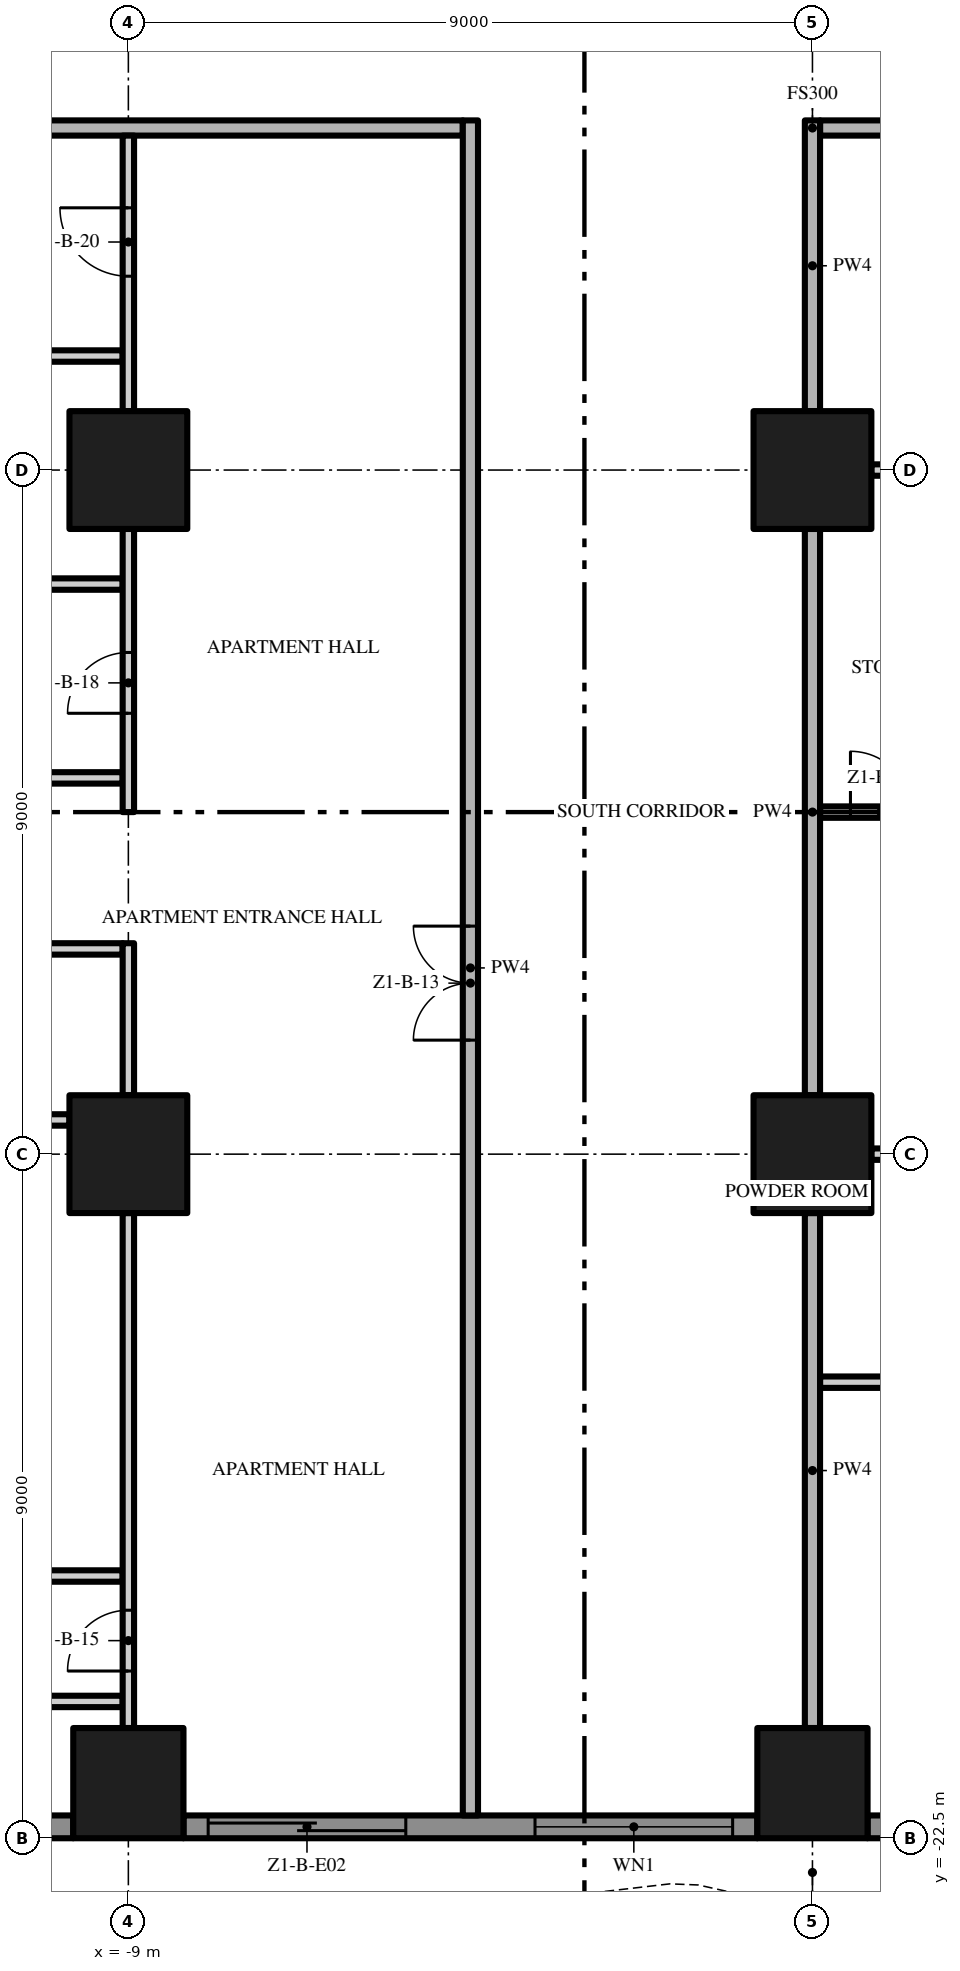
"""IFC4 building model, lengths in metres.
Left out: names, types, materials, properties, quantities, classifications, styles, units other than length and angle.
Written with IfcOpenShell. Run it as: python <this file> out.ifc"""

import sys

from ifc_helpers import new_model, si_unit, direction, frame, frame_2d, origin, origin_2d, place, context, subcontext, project, spatial, polyline, rectangle, outline, extrude, element, fill, save


model = new_model("IFC4")
c1 = context("Model", 3, precision=1e-05, world=origin(), true_north=direction((0.0, 1.0)))
c2 = subcontext(c1, "Body", "Model", "MODEL_VIEW")
j1 = project(units=[si_unit("LENGTHUNIT", "METRE"), si_unit("PLANEANGLEUNIT", "RADIAN")], contexts=[c1])
p1 = place(None, origin())
s1 = spatial("IfcSite", under=j1, at=p1, CompositionType="ELEMENT")
p2 = place(p1, origin())
s2 = spatial("IfcBuilding", under=s1, at=p2, CompositionType="ELEMENT")
p3 = place(p2, frame((0.0, 0.0, 26.4)))
s3 = spatial("IfcBuildingStorey", under=s2, at=p3, CompositionType="ELEMENT", Elevation=26.4)
p4 = place(p3, frame((-9.0, -13.5, 0.0), z_axis=(0.0, 0.0, 1.0), x_axis=(1.0, 0.0, 0.0)))
e1 = element("IfcColumn", 1, at=p4, inside=s3, PredefinedType="COLUMN", context=c2, shape_type="SweptSolid", body=[
    extrude(rectangle(XDim=1.55, YDim=1.55, at=origin_2d()), origin(), (0.0, 0.0, 1.0), 3.5),
])
p5 = place(p3, frame((-9.0, -21.775, 0.0), z_axis=(0.0, 0.0, 1.0), x_axis=(1.0, 0.0, 0.0)))
e2 = element("IfcColumn", 2, at=p5, inside=s3, PredefinedType="COLUMN", context=c2, shape_type="SweptSolid", body=[
    extrude(rectangle(XDim=1.45, YDim=1.45, at=origin_2d()), origin(), (0.0, 0.0, 1.0), 3.5),
])
for number, where, z_axis, x_axis in (
    (3, (-9.0, -4.5, 0.0), (0.0, 0.0, 1.0), (1.0, 0.0, 0.0)),
    (4, (0.0, -13.5, 0.0), (0.0, 0.0, 1.0), (1.0, 0.0, 0.0)),
):
    element("IfcColumn", number, at=place(p3, frame(where, z_axis=z_axis, x_axis=x_axis)), inside=s3, PredefinedType="COLUMN", context=c2, shape_type="SweptSolid", body=[
        extrude(rectangle(XDim=1.55, YDim=1.55, at=origin_2d()), origin(), (0.0, 0.0, 1.0), 3.5),
    ])
p6 = place(p3, frame((0.0, -21.775, 0.0), z_axis=(0.0, 0.0, 1.0), x_axis=(1.0, 0.0, 0.0)))
e5 = element("IfcColumn", 5, at=p6, inside=s3, PredefinedType="COLUMN", context=c2, shape_type="SweptSolid", body=[
    extrude(rectangle(XDim=1.45, YDim=1.45, at=origin_2d()), origin(), (0.0, 0.0, 1.0), 3.5),
])
p7 = place(p3, frame((0.0, -4.5, 0.0), z_axis=(0.0, 0.0, 1.0), x_axis=(1.0, 0.0, 0.0)))
e6 = element("IfcColumn", 6, at=p7, inside=s3, PredefinedType="COLUMN", context=c2, shape_type="SweptSolid", body=[
    extrude(rectangle(XDim=1.55, YDim=1.55, at=origin_2d()), origin(), (0.0, 0.0, 1.0), 3.5),
])
p8 = place(p3, frame((-9.725, -22.35, 0.0), z_axis=(0.0, 0.0, 1.0), x_axis=(-1.0, 0.0, 0.0)))
e7 = element("IfcWall", 7, at=p8, inside=s3, PredefinedType="SOLIDWALL", context=c2, shape_type="SweptSolid", body=[
    extrude(rectangle(XDim=7.55, YDim=0.3, at=frame_2d((3.775, 0.0))), origin(), (0.0, 0.0, 1.0), 3.5),
])
p9 = place(p8, frame((4.625, 0.0, 0.45)))
e8 = element("IfcOpeningElement", 8, at=p9, cuts=e7, PredefinedType="OPENING", context=c2, shape_type="SweptSolid", body=[
    extrude(rectangle(XDim=2.6, YDim=2.65, at=frame_2d((1.3, 1.325))), frame((0.0, 0.16, 0.0), z_axis=(0.0, -1.0, 0.0), x_axis=(1.0, 0.0, 0.0)), (0.0, 0.0, 1.0), 0.32),
])
p10 = place(p8, frame((0.325, 0.0, 0.0)))
e9 = element("IfcOpeningElement", 9, at=p10, cuts=e7, PredefinedType="OPENING", context=c2, shape_type="SweptSolid", body=[
    extrude(rectangle(XDim=2.6, YDim=2.4, at=frame_2d((1.3, 1.2))), frame((0.0, 0.16, 0.0), z_axis=(0.0, -1.0, 0.0), x_axis=(1.0, 0.0, 0.0)), (0.0, 0.0, 1.0), 0.32),
])
p11 = place(p3, frame((-0.725, -22.35, 0.0), z_axis=(0.0, 0.0, 1.0), x_axis=(-1.0, 0.0, 0.0)))
e10 = element("IfcWall", 10, at=p11, inside=s3, PredefinedType="SOLIDWALL", context=c2, shape_type="SweptSolid", body=[
    extrude(rectangle(XDim=7.55, YDim=0.3, at=frame_2d((3.775, 0.0))), origin(), (0.0, 0.0, 1.0), 3.5),
])
p12 = place(p11, frame((4.625, 0.0, 0.0)))
e11 = element("IfcOpeningElement", 11, at=p12, cuts=e10, PredefinedType="OPENING", context=c2, shape_type="SweptSolid", body=[
    extrude(rectangle(XDim=2.6, YDim=2.4, at=frame_2d((1.3, 1.2))), frame((0.0, 0.16, 0.0), z_axis=(0.0, -1.0, 0.0), x_axis=(1.0, 0.0, 0.0)), (0.0, 0.0, 1.0), 0.32),
])
p13 = place(p11, frame((0.325, 0.0, 0.45)))
e12 = element("IfcOpeningElement", 12, at=p13, cuts=e10, PredefinedType="OPENING", context=c2, shape_type="SweptSolid", body=[
    extrude(rectangle(XDim=2.6, YDim=2.65, at=frame_2d((1.3, 1.325))), frame((0.0, 0.16, 0.0), z_axis=(0.0, -1.0, 0.0), x_axis=(1.0, 0.0, 0.0)), (0.0, 0.0, 1.0), 0.32),
])
p14 = place(p3, frame((8.275, -22.35, 0.0), z_axis=(0.0, 0.0, 1.0), x_axis=(-1.0, 0.0, 0.0)))
e13 = element("IfcWall", 13, at=p14, inside=s3, PredefinedType="SOLIDWALL", context=c2, shape_type="SweptSolid", body=[
    extrude(rectangle(XDim=7.55, YDim=0.3, at=frame_2d((3.775, 0.0))), origin(), (0.0, 0.0, 1.0), 3.5),
])
p15 = place(p14, frame((4.625, 0.0, 0.45)))
e14 = element("IfcOpeningElement", 14, at=p15, cuts=e13, PredefinedType="OPENING", context=c2, shape_type="SweptSolid", body=[
    extrude(rectangle(XDim=2.6, YDim=2.65, at=frame_2d((1.3, 1.325))), frame((0.0, 0.16, 0.0), z_axis=(0.0, -1.0, 0.0), x_axis=(1.0, 0.0, 0.0)), (0.0, 0.0, 1.0), 0.32),
])
p16 = place(p14, frame((0.325, 0.0, 0.0)))
e15 = element("IfcOpeningElement", 15, at=p16, cuts=e13, PredefinedType="OPENING", context=c2, shape_type="SweptSolid", body=[
    extrude(rectangle(XDim=2.6, YDim=2.4, at=frame_2d((1.3, 1.2))), frame((0.0, 0.16, 0.0), z_axis=(0.0, -1.0, 0.0), x_axis=(1.0, 0.0, 0.0)), (0.0, 0.0, 1.0), 0.32),
])
p17 = place(p3, origin())
e16 = element("IfcWall", 16, at=p17, inside=s3, PredefinedType="USERDEFINED", context=c2, shape_type="SweptSolid", body=[
    extrude(outline(polyline([(-22.5, -25.149), (-21.0, -24.488), (-19.5, -23.755), (-18.0, -23.231), (-16.875, -23.1), (-16.5, -23.115), (-15.0, -23.451), (-13.5, -24.112), (-12.0, -24.845), (-10.5, -25.369), (-9.375, -25.5), (-9.0, -25.485), (-7.5, -25.149), (-6.0, -24.488), (-4.5, -23.755), (-3.0, -23.231), (-1.875, -23.1), (-1.5, -23.115), (0.0, -23.451), (1.5, -24.112), (3.0, -24.845), (4.5, -25.369), (5.625, -25.5), (6.0, -25.485), (7.5, -25.149), (9.0, -24.488), (10.5, -23.755), (12.0, -23.231), (13.125, -23.1), (13.5, -23.115), (15.0, -23.451), (16.5, -24.112), (18.0, -24.845), (19.5, -25.369), (20.625, -25.5), (21.0, -25.485), (22.5, -25.149), (22.445, -24.905), (20.967, -25.236), (20.635, -25.249), (19.556, -25.124), (18.096, -24.614), (16.605, -23.885), (15.079, -23.213), (13.533, -22.866), (13.115, -22.849), (11.944, -22.986), (10.404, -23.524), (8.895, -24.261), (7.421, -24.91), (5.967, -25.236), (5.635, -25.249), (4.556, -25.124), (3.096, -24.614), (1.605, -23.885), (0.079, -23.213), (-1.467, -22.866), (-1.885, -22.849), (-3.056, -22.986), (-4.596, -23.524), (-6.105, -24.261), (-7.579, -24.91), (-9.033, -25.236), (-9.365, -25.249), (-10.444, -25.124), (-11.904, -24.614), (-13.395, -23.885), (-14.921, -23.213), (-16.467, -22.866), (-16.885, -22.849), (-18.056, -22.986), (-19.596, -23.524), (-21.105, -24.261), (-22.601, -24.92), (-22.5, -25.149)])), origin(), (0.0, 0.0, 1.0), 0.9),
])
for number, where, z_axis, x_axis in (
    (17, (-13.425, -20.7, 0.0), (0.0, 0.0, 1.0), (1.0, 0.0, 0.0)),
    (18, (-13.425, -19.05, 0.0), (0.0, 0.0, 1.0), (1.0, 0.0, 0.0)),
):
    element("IfcWall", number, at=place(p3, frame(where, z_axis=z_axis, x_axis=x_axis)), inside=s3, PredefinedType="PARTITIONING", context=c2, shape_type="SweptSolid", body=[
        extrude(rectangle(XDim=4.35, YDim=0.15, at=frame_2d((2.175, 0.0))), origin(), (0.0, 0.0, 1.0), 3.5),
    ])
p18 = place(p3, frame((0.1, -16.5, 0.0), z_axis=(0.0, 0.0, 1.0), x_axis=(1.0, 0.0, 0.0)))
e19 = element("IfcWall", 19, at=p18, inside=s3, PredefinedType="PARTITIONING", context=c2, shape_type="SweptSolid", body=[
    extrude(rectangle(XDim=2.075, YDim=0.15, at=frame_2d((1.038, 0.0))), origin(), (0.0, 0.0, 1.0), 3.5),
])
p19 = place(p3, frame((8.225, -13.5, 0.0), z_axis=(0.0, 0.0, 1.0), x_axis=(-1.0, 0.0, 0.0)))
e20 = element("IfcWall", 20, at=p19, inside=s3, PredefinedType="PARTITIONING", context=c2, shape_type="SweptSolid", body=[
    extrude(rectangle(XDim=7.45, YDim=0.15, at=frame_2d((3.725, 0.0))), origin(), (0.0, 0.0, 1.0), 3.5),
])
p20 = place(p19, frame((1.725, 0.0, 0.0)))
e21 = element("IfcOpeningElement", 21, at=p20, cuts=e20, PredefinedType="OPENING", context=c2, shape_type="SweptSolid", body=[
    extrude(rectangle(XDim=1.8, YDim=2.4, at=frame_2d((0.9, 1.2))), frame((0.0, 0.085, 0.0), z_axis=(0.0, -1.0, 0.0), x_axis=(1.0, 0.0, 0.0)), (0.0, 0.0, 1.0), 0.17),
])
p21 = place(p3, frame((-13.425, -13.05, 0.0), z_axis=(0.0, 0.0, 1.0), x_axis=(1.0, 0.0, 0.0)))
e22 = element("IfcWall", 22, at=p21, inside=s3, PredefinedType="PARTITIONING", context=c2, shape_type="SweptSolid", body=[
    extrude(rectangle(XDim=3.65, YDim=0.15, at=frame_2d((1.825, 0.0))), origin(), (0.0, 0.0, 1.0), 3.5),
])
p22 = place(p3, frame((-9.075, -10.8, 0.0), z_axis=(0.0, 0.0, 1.0), x_axis=(-1.0, 0.0, 0.0)))
e23 = element("IfcWall", 23, at=p22, inside=s3, PredefinedType="PARTITIONING", context=c2, shape_type="SweptSolid", body=[
    extrude(rectangle(XDim=4.35, YDim=0.15, at=frame_2d((2.175, 0.0))), origin(), (0.0, 0.0, 1.0), 3.5),
])
p23 = place(p22, frame((1.7, 0.0, 0.0)))
e24 = element("IfcOpeningElement", 24, at=p23, cuts=e23, PredefinedType="OPENING", context=c2, shape_type="SweptSolid", body=[
    extrude(rectangle(XDim=0.9, YDim=2.1, at=frame_2d((0.45, 1.05))), frame((0.0, 0.085, 0.0), z_axis=(0.0, -1.0, 0.0), x_axis=(1.0, 0.0, 0.0)), (0.0, 0.0, 1.0), 0.17),
])
p24 = place(p3, frame((0.1, -9.0, 0.0), z_axis=(0.0, 0.0, 1.0), x_axis=(1.0, 0.0, 0.0)))
e25 = element("IfcWall", 25, at=p24, inside=s3, PredefinedType="PARTITIONING", context=c2, shape_type="SweptSolid", body=[
    extrude(rectangle(XDim=11.525, YDim=0.15, at=frame_2d((5.763, 0.0))), origin(), (0.0, 0.0, 1.0), 3.5),
])
p25 = place(p24, frame((0.4, 0.0, 0.0)))
e26 = element("IfcOpeningElement", 26, at=p25, cuts=e25, PredefinedType="OPENING", context=c2, shape_type="SweptSolid", body=[
    extrude(rectangle(XDim=0.8, YDim=2.0, at=frame_2d((0.4, 1.0))), frame((0.0, 0.085, 0.0), z_axis=(0.0, -1.0, 0.0), x_axis=(1.0, 0.0, 0.0)), (0.0, 0.0, 1.0), 0.17),
])
p26 = place(p24, frame((5.85, 0.0, 0.0)))
e27 = element("IfcOpeningElement", 27, at=p26, cuts=e25, PredefinedType="OPENING", context=c2, shape_type="SweptSolid", body=[
    extrude(rectangle(XDim=1.0, YDim=2.4, at=frame_2d((0.5, 1.2))), frame((0.0, 0.085, 0.0), z_axis=(0.0, -1.0, 0.0), x_axis=(1.0, 0.0, 0.0)), (0.0, 0.0, 1.0), 0.17),
])
for number, where, z_axis, x_axis in (
    (28, (-13.425, -8.55, 0.0), (0.0, 0.0, 1.0), (1.0, 0.0, 0.0)),
    (29, (-13.425, -6.0, 0.0), (0.0, 0.0, 1.0), (1.0, 0.0, 0.0)),
):
    element("IfcWall", number, at=place(p3, frame(where, z_axis=z_axis, x_axis=x_axis)), inside=s3, PredefinedType="PARTITIONING", context=c2, shape_type="SweptSolid", body=[
        extrude(rectangle(XDim=4.35, YDim=0.15, at=frame_2d((2.175, 0.0))), origin(), (0.0, 0.0, 1.0), 3.5),
    ])
p27 = place(p3, frame((8.225, -4.5, 0.0), z_axis=(0.0, 0.0, 1.0), x_axis=(-1.0, 0.0, 0.0)))
e30 = element("IfcWall", 30, at=p27, inside=s3, PredefinedType="PARTITIONING", context=c2, shape_type="SweptSolid", body=[
    extrude(rectangle(XDim=7.45, YDim=0.15, at=frame_2d((3.725, 0.0))), origin(), (0.0, 0.0, 1.0), 3.5),
])
p28 = place(p27, frame((5.225, 0.0, 0.0)))
e31 = element("IfcOpeningElement", 31, at=p28, cuts=e30, PredefinedType="OPENING", context=c2, shape_type="SweptSolid", body=[
    extrude(rectangle(XDim=0.8, YDim=2.0, at=frame_2d((0.4, 1.0))), frame((0.0, 0.085, 0.0), z_axis=(0.0, -1.0, 0.0), x_axis=(1.0, 0.0, 0.0)), (0.0, 0.0, 1.0), 0.17),
])
p29 = place(p3, frame((-13.425, -3.0, 0.0), z_axis=(0.0, 0.0, 1.0), x_axis=(1.0, 0.0, 0.0)))
e32 = element("IfcWall", 32, at=p29, inside=s3, PredefinedType="PARTITIONING", context=c2, shape_type="SweptSolid", body=[
    extrude(rectangle(XDim=4.35, YDim=0.15, at=frame_2d((2.175, 0.0))), origin(), (0.0, 0.0, 1.0), 3.5),
])
p30 = place(p3, frame((-17.4, 0.0, 0.0), z_axis=(0.0, 0.0, 1.0), x_axis=(1.0, 0.0, 0.0)))
e33 = element("IfcWall", 33, at=p30, inside=s3, PredefinedType="PARTITIONING", context=c2, shape_type="SweptSolid", body=[
    extrude(rectangle(XDim=12.8, YDim=0.2, at=frame_2d((6.4, 0.0))), origin(), (0.0, 0.0, 1.0), 3.5),
])
p31 = place(p3, frame((17.4, 0.0, 0.0), z_axis=(0.0, 0.0, 1.0), x_axis=(-1.0, 0.0, 0.0)))
e34 = element("IfcWall", 34, at=p31, inside=s3, PredefinedType="PARTITIONING", context=c2, shape_type="SweptSolid", body=[
    extrude(rectangle(XDim=17.3, YDim=0.2, at=frame_2d((8.65, 0.0))), origin(), (0.0, 0.0, 1.0), 3.5),
])
p32 = place(p31, frame((7.65, 0.0, 0.0)))
e35 = element("IfcOpeningElement", 35, at=p32, cuts=e34, PredefinedType="OPENING", context=c2, shape_type="SweptSolid", body=[
    extrude(rectangle(XDim=1.5, YDim=2.4, at=frame_2d((0.75, 1.2))), frame((0.0, 0.11, 0.0), z_axis=(0.0, -1.0, 0.0), x_axis=(1.0, 0.0, 0.0)), (0.0, 0.0, 1.0), 0.22),
])
p33 = place(p3, frame((-9.0, -21.05, 0.0), z_axis=(0.0, 0.0, 1.0), x_axis=(0.0, 1.0, 0.0)))
e36 = element("IfcWall", 36, at=p33, inside=s3, PredefinedType="PARTITIONING", context=c2, shape_type="SweptSolid", body=[
    extrude(rectangle(XDim=6.775, YDim=0.15, at=frame_2d((3.388, 0.0))), origin(), (0.0, 0.0, 1.0), 3.5),
])
p34 = place(p33, frame((0.75, 0.0, 0.0)))
e37 = element("IfcOpeningElement", 37, at=p34, cuts=e36, PredefinedType="OPENING", context=c2, shape_type="SweptSolid", body=[
    extrude(rectangle(XDim=0.8, YDim=2.0, at=frame_2d((0.4, 1.0))), frame((0.0, 0.085, 0.0), z_axis=(0.0, -1.0, 0.0), x_axis=(1.0, 0.0, 0.0)), (0.0, 0.0, 1.0), 0.17),
])
p35 = place(p3, frame((-9.0, -12.725, 0.0), z_axis=(0.0, 0.0, 1.0), x_axis=(0.0, 1.0, 0.0)))
e38 = element("IfcWall", 38, at=p35, inside=s3, PredefinedType="PARTITIONING", context=c2, shape_type="SweptSolid", body=[
    extrude(rectangle(XDim=2.0, YDim=0.15, at=frame_2d((1.0, 0.0))), origin(), (0.0, 0.0, 1.0), 3.5),
])
p36 = place(p3, frame((-9.0, -9.0, 0.0), z_axis=(0.0, 0.0, 1.0), x_axis=(0.0, 1.0, 0.0)))
e39 = element("IfcWall", 39, at=p36, inside=s3, PredefinedType="PARTITIONING", context=c2, shape_type="SweptSolid", body=[
    extrude(rectangle(XDim=3.725, YDim=0.15, at=frame_2d((1.863, 0.0))), origin(), (0.0, 0.0, 1.0), 3.5),
])
p37 = place(p36, frame((1.3, 0.0, 0.0)))
e40 = element("IfcOpeningElement", 40, at=p37, cuts=e39, PredefinedType="OPENING", context=c2, shape_type="SweptSolid", body=[
    extrude(rectangle(XDim=0.8, YDim=2.0, at=frame_2d((0.4, 1.0))), frame((0.0, 0.085, 0.0), z_axis=(0.0, -1.0, 0.0), x_axis=(1.0, 0.0, 0.0)), (0.0, 0.0, 1.0), 0.17),
])
p38 = place(p3, frame((-9.0, -3.725, 0.0), z_axis=(0.0, 0.0, 1.0), x_axis=(0.0, 1.0, 0.0)))
e41 = element("IfcWall", 41, at=p38, inside=s3, PredefinedType="PARTITIONING", context=c2, shape_type="SweptSolid", body=[
    extrude(rectangle(XDim=3.625, YDim=0.15, at=frame_2d((1.812, 0.0))), origin(), (0.0, 0.0, 1.0), 3.5),
])
p39 = place(p38, frame((1.775, 0.0, 0.0)))
e42 = element("IfcOpeningElement", 42, at=p39, cuts=e41, PredefinedType="OPENING", context=c2, shape_type="SweptSolid", body=[
    extrude(rectangle(XDim=0.9, YDim=2.1, at=frame_2d((0.45, 1.05))), frame((0.0, 0.085, 0.0), z_axis=(0.0, -1.0, 0.0), x_axis=(1.0, 0.0, 0.0)), (0.0, 0.0, 1.0), 0.17),
])
p40 = place(p3, frame((-4.5, -22.2, 0.0), z_axis=(0.0, 0.0, 1.0), x_axis=(0.0, 1.0, 0.0)))
e43 = element("IfcWall", 43, at=p40, inside=s3, PredefinedType="PARTITIONING", context=c2, shape_type="SweptSolid", body=[
    extrude(rectangle(XDim=22.3, YDim=0.2, at=frame_2d((11.15, 0.0))), origin(), (0.0, 0.0, 1.0), 3.5),
])
p41 = place(p40, frame((10.2, 0.0, 0.0)))
e44 = element("IfcOpeningElement", 44, at=p41, cuts=e43, PredefinedType="OPENING", context=c2, shape_type="SweptSolid", body=[
    extrude(rectangle(XDim=1.5, YDim=2.4, at=frame_2d((0.75, 1.2))), frame((0.0, 0.11, 0.0), z_axis=(0.0, -1.0, 0.0), x_axis=(1.0, 0.0, 0.0)), (0.0, 0.0, 1.0), 0.22),
])
p42 = place(p3, frame((0.0, -21.05, 0.0), z_axis=(0.0, 0.0, 1.0), x_axis=(0.0, 1.0, 0.0)))
e45 = element("IfcWall", 45, at=p42, inside=s3, PredefinedType="PARTITIONING", context=c2, shape_type="SweptSolid", body=[
    extrude(rectangle(XDim=6.775, YDim=0.2, at=frame_2d((3.388, 0.0))), origin(), (0.0, 0.0, 1.0), 3.5),
])
p43 = place(p3, frame((0.0, -12.725, 0.0), z_axis=(0.0, 0.0, 1.0), x_axis=(0.0, 1.0, 0.0)))
e46 = element("IfcWall", 46, at=p43, inside=s3, PredefinedType="PARTITIONING", context=c2, shape_type="SweptSolid", body=[
    extrude(rectangle(XDim=7.45, YDim=0.2, at=frame_2d((3.725, 0.0))), origin(), (0.0, 0.0, 1.0), 3.5),
])
p44 = place(p3, frame((0.0, -3.725, 0.0), z_axis=(0.0, 0.0, 1.0), x_axis=(0.0, 1.0, 0.0)))
e47 = element("IfcWall", 47, at=p44, inside=s3, PredefinedType="PARTITIONING", context=c2, shape_type="SweptSolid", body=[
    extrude(rectangle(XDim=3.825, YDim=0.2, at=frame_2d((1.913, 0.0))), origin(), (0.0, 0.0, 1.0), 3.5),
])
p45 = place(p12, origin())
e48 = element("IfcDoor", 48, at=p45, inside=s3, OperationType="SINGLE_SWING_LEFT", PredefinedType="DOOR", context=c2, shape_type="SweptSolid", body=[
    extrude(rectangle(XDim=2.6, YDim=2.4, at=frame_2d((1.3, 1.2))), frame((0.0, 0.025, 0.0), z_axis=(0.0, -1.0, 0.0), x_axis=(1.0, 0.0, 0.0)), (0.0, 0.0, 1.0), 0.05),
])
fill(e11, e48)
p46 = place(p13, origin())
e49 = element("IfcWindow", 49, at=p46, inside=s3, PartitioningType="SINGLE_PANEL", PredefinedType="WINDOW", context=c2, shape_type="SweptSolid", body=[
    extrude(rectangle(XDim=2.6, YDim=2.65, at=frame_2d((1.3, 1.325))), frame((0.0, 0.03, 0.0), z_axis=(0.0, -1.0, 0.0), x_axis=(1.0, 0.0, 0.0)), (0.0, 0.0, 1.0), 0.06),
])
fill(e12, e49)
p47 = place(p41, origin())
e50 = element("IfcDoor", 50, at=p47, inside=s3, OperationType="DOUBLE_DOOR_SINGLE_SWING", PredefinedType="DOOR", context=c2, shape_type="SweptSolid", body=[
    extrude(rectangle(XDim=1.5, YDim=2.4, at=frame_2d((0.75, 1.2))), frame((0.0, 0.025, 0.0), z_axis=(0.0, -1.0, 0.0), x_axis=(1.0, 0.0, 0.0)), (0.0, 0.0, 1.0), 0.05),
])
fill(e44, e50)
p48 = place(p34, origin())
e51 = element("IfcDoor", 51, at=p48, inside=s3, OperationType="SINGLE_SWING_LEFT", PredefinedType="DOOR", context=c2, shape_type="SweptSolid", body=[
    extrude(rectangle(XDim=0.8, YDim=2.0, at=frame_2d((0.4, 1.0))), frame((0.0, 0.025, 0.0), z_axis=(0.0, -1.0, 0.0), x_axis=(1.0, 0.0, 0.0)), (0.0, 0.0, 1.0), 0.05),
])
fill(e37, e51)
p49 = place(p37, origin())
e52 = element("IfcDoor", 52, at=p49, inside=s3, OperationType="SINGLE_SWING_LEFT", PredefinedType="DOOR", context=c2, shape_type="SweptSolid", body=[
    extrude(rectangle(XDim=0.8, YDim=2.0, at=frame_2d((0.4, 1.0))), frame((0.0, 0.025, 0.0), z_axis=(0.0, -1.0, 0.0), x_axis=(1.0, 0.0, 0.0)), (0.0, 0.0, 1.0), 0.05),
])
fill(e40, e52)
p50 = place(p39, origin())
e53 = element("IfcDoor", 53, at=p50, inside=s3, OperationType="SINGLE_SWING_RIGHT", PredefinedType="DOOR", context=c2, shape_type="SweptSolid", body=[
    extrude(rectangle(XDim=0.9, YDim=2.1, at=frame_2d((0.45, 1.05))), frame((0.0, 0.025, 0.0), z_axis=(0.0, -1.0, 0.0), x_axis=(1.0, 0.0, 0.0)), (0.0, 0.0, 1.0), 0.05),
])
fill(e42, e53)
p51 = place(p25, origin())
e54 = element("IfcDoor", 54, at=p51, inside=s3, OperationType="SINGLE_SWING_LEFT", PredefinedType="DOOR", context=c2, shape_type="SweptSolid", body=[
    extrude(rectangle(XDim=0.8, YDim=2.0, at=frame_2d((0.4, 1.0))), frame((0.0, 0.025, 0.0), z_axis=(0.0, -1.0, 0.0), x_axis=(1.0, 0.0, 0.0)), (0.0, 0.0, 1.0), 0.05),
])
fill(e26, e54)
save(model, sys.argv[1])
